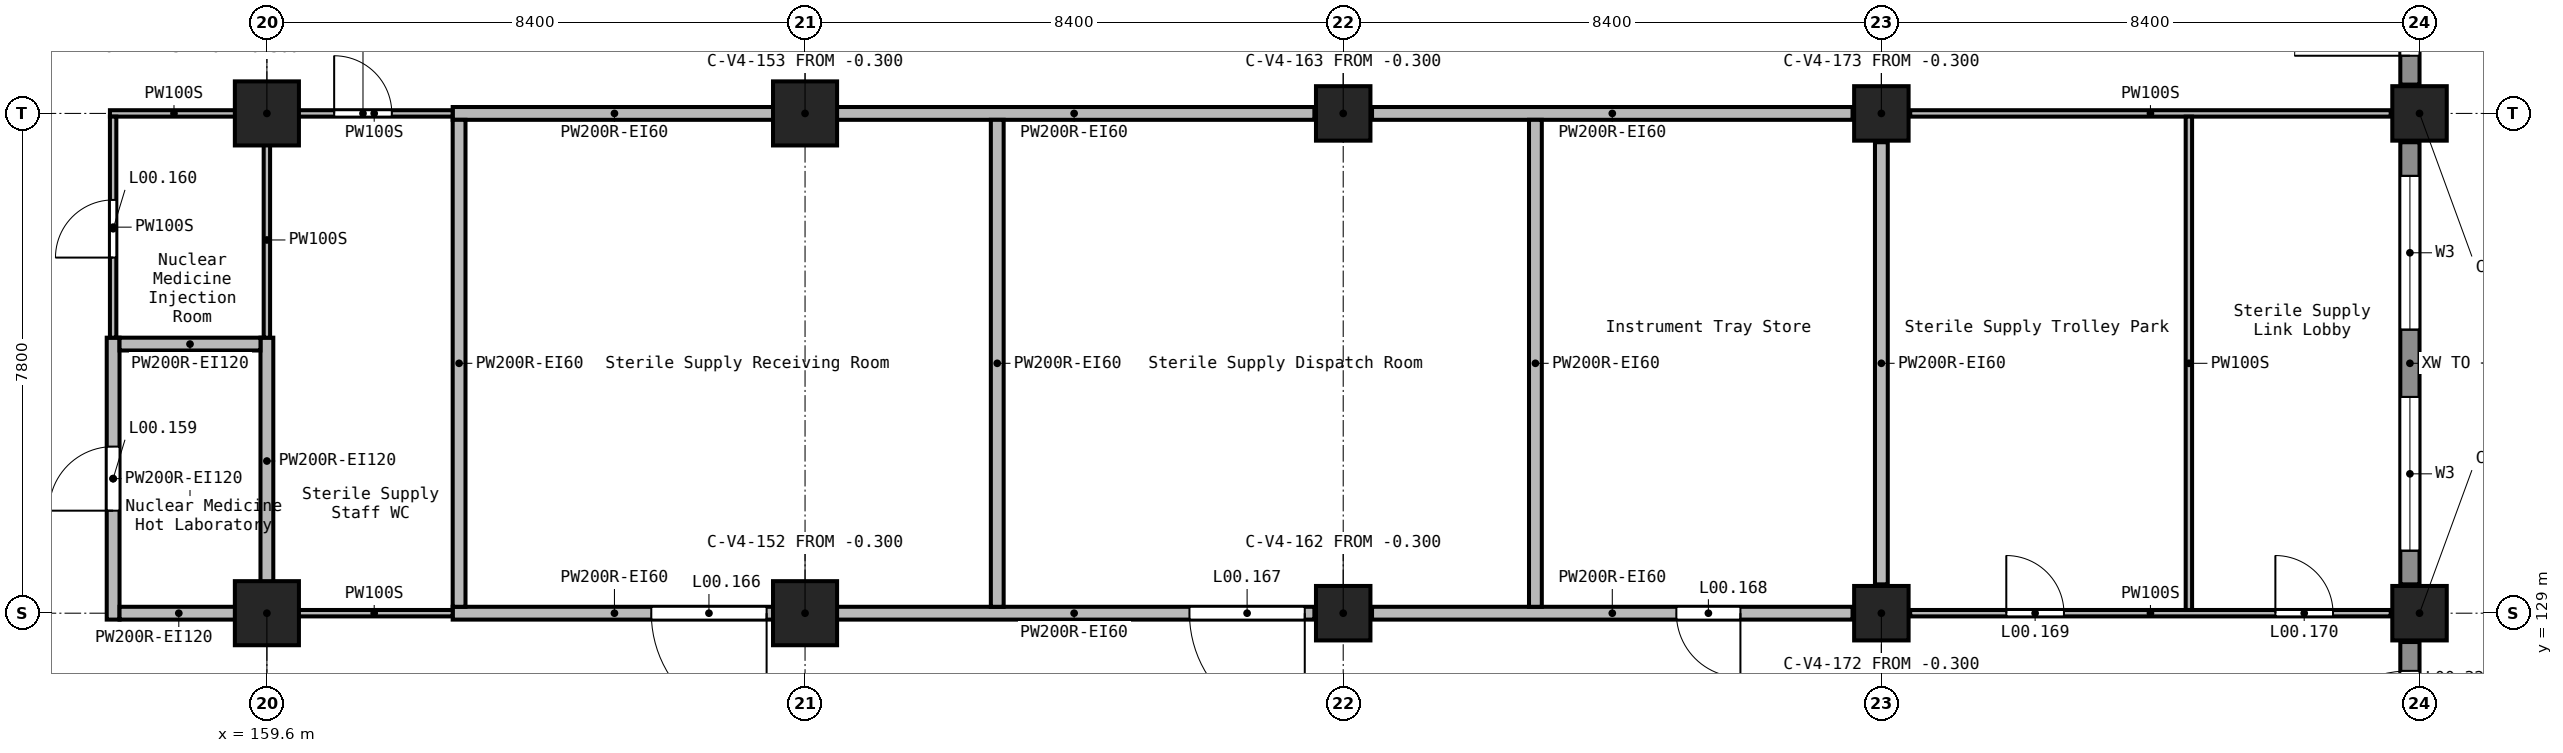
"""IFC4 building model, lengths in metres.
Left out: names, types, materials, properties, quantities, classifications, styles, units other than length and angle.
Written with IfcOpenShell. Run it as: python <this file> out.ifc"""

import sys

from ifc_helpers import new_model, si_unit, direction, frame, frame_2d, origin, origin_2d, place, context, subcontext, project, spatial, rectangle, extrude, element, fill, save


model = new_model("IFC4")
c1 = context("Model", 3, precision=1e-05, world=origin(), true_north=direction((0.0, 1.0)))
c2 = subcontext(c1, "Body", "Model", "MODEL_VIEW")
j1 = project(units=[si_unit("LENGTHUNIT", "METRE"), si_unit("PLANEANGLEUNIT", "RADIAN")], contexts=[c1])
p1 = place(None, origin())
s1 = spatial("IfcSite", under=j1, at=p1, CompositionType="ELEMENT")
p2 = place(p1, origin())
s2 = spatial("IfcBuilding", under=s1, at=p2, CompositionType="ELEMENT")
p3 = place(p2, origin())
s3 = spatial("IfcBuildingStorey", under=s2, at=p3, CompositionType="ELEMENT", Elevation=0.0)
for number, where, z_axis, x_axis in (
    (1, (159.6, 129.0, -0.3), (0.0, 0.0, 1.0), (1.0, 0.0, 0.0)),
    (2, (159.6, 136.8, -0.3), (0.0, 0.0, 1.0), (1.0, 0.0, 0.0)),
    (3, (168.0, 129.0, -0.3), (0.0, 0.0, 1.0), (1.0, 0.0, 0.0)),
    (4, (168.0, 136.8, -0.3), (0.0, 0.0, 1.0), (1.0, 0.0, 0.0)),
):
    element("IfcColumn", number, at=place(p3, frame(where, z_axis=z_axis, x_axis=x_axis)), inside=s3, PredefinedType="COLUMN", context=c2, shape_type="SweptSolid", body=[
        extrude(rectangle(XDim=1.0, YDim=1.0, at=origin_2d()), origin(), (0.0, 0.0, 1.0), 5.7),
    ])
for number, where, z_axis, x_axis in (
    (5, (176.4, 129.0, -0.3), (0.0, 0.0, 1.0), (1.0, 0.0, 0.0)),
    (6, (176.4, 136.8, -0.3), (0.0, 0.0, 1.0), (1.0, 0.0, 0.0)),
    (7, (184.8, 129.0, -0.3), (0.0, 0.0, 1.0), (1.0, 0.0, 0.0)),
    (8, (184.8, 136.8, -0.3), (0.0, 0.0, 1.0), (1.0, 0.0, 0.0)),
    (9, (193.2, 129.0, -0.3), (0.0, 0.0, 1.0), (1.0, 0.0, 0.0)),
    (10, (193.2, 136.8, -0.3), (0.0, 0.0, 1.0), (1.0, 0.0, 0.0)),
):
    element("IfcColumn", number, at=place(p3, frame(where, z_axis=z_axis, x_axis=x_axis)), inside=s3, PredefinedType="COLUMN", context=c2, shape_type="SweptSolid", body=[
        extrude(rectangle(XDim=0.85, YDim=0.85, at=origin_2d()), origin(), (0.0, 0.0, 1.0), 5.7),
    ])
p4 = place(p3, frame((193.05, 125.85, 0.0), z_axis=(0.0, 0.0, 1.0), x_axis=(0.0, 1.0, 0.0)))
e11 = element("IfcWall", 11, at=p4, inside=s3, PredefinedType="STANDARD", context=c2, shape_type="SweptSolid", body=[
    extrude(rectangle(XDim=2.7, YDim=0.3, at=frame_2d((1.35, 0.0))), origin(), (0.0, 0.0, 1.0), 4.25),
])
p5 = place(p4, frame((0.45, 0.0, 0.0)))
e12 = element("IfcOpeningElement", 12, at=p5, cuts=e11, PredefinedType="OPENING", context=c2, shape_type="SweptSolid", body=[
    extrude(rectangle(XDim=1.8, YDim=2.1, at=frame_2d((0.9, 1.05))), frame((0.0, 0.16, 0.0), z_axis=(0.0, -1.0, 0.0), x_axis=(1.0, 0.0, 0.0)), (0.0, 0.0, 1.0), 0.32),
])
p6 = place(p3, frame((193.05, 129.45, 0.0), z_axis=(0.0, 0.0, 1.0), x_axis=(0.0, 1.0, 0.0)))
e13 = element("IfcWall", 13, at=p6, inside=s3, PredefinedType="STANDARD", context=c2, shape_type="SweptSolid", body=[
    extrude(rectangle(XDim=6.9, YDim=0.3, at=frame_2d((3.45, 0.0))), origin(), (0.0, 0.0, 1.0), 4.25),
])
p7 = place(p6, frame((0.525, 0.0, 0.9)))
e14 = element("IfcOpeningElement", 14, at=p7, cuts=e13, PredefinedType="OPENING", context=c2, shape_type="SweptSolid", body=[
    extrude(rectangle(XDim=2.4, YDim=1.5, at=frame_2d((1.2, 0.75))), frame((0.0, 0.16, 0.0), z_axis=(0.0, -1.0, 0.0), x_axis=(1.0, 0.0, 0.0)), (0.0, 0.0, 1.0), 0.32),
])
p8 = place(p6, frame((3.975, 0.0, 0.9)))
e15 = element("IfcOpeningElement", 15, at=p8, cuts=e13, PredefinedType="OPENING", context=c2, shape_type="SweptSolid", body=[
    extrude(rectangle(XDim=2.4, YDim=1.5, at=frame_2d((1.2, 0.75))), frame((0.0, 0.16, 0.0), z_axis=(0.0, -1.0, 0.0), x_axis=(1.0, 0.0, 0.0)), (0.0, 0.0, 1.0), 0.32),
])
p9 = place(p3, frame((193.05, 137.25, 0.0), z_axis=(0.0, 0.0, 1.0), x_axis=(0.0, 1.0, 0.0)))
e16 = element("IfcWall", 16, at=p9, inside=s3, PredefinedType="STANDARD", context=c2, shape_type="SweptSolid", body=[
    extrude(rectangle(XDim=2.7, YDim=0.3, at=frame_2d((1.35, 0.0))), origin(), (0.0, 0.0, 1.0), 4.25),
])
p10 = place(p9, frame((0.45, 0.0, 0.0)))
e17 = element("IfcOpeningElement", 17, at=p10, cuts=e16, PredefinedType="OPENING", context=c2, shape_type="SweptSolid", body=[
    extrude(rectangle(XDim=1.8, YDim=2.1, at=frame_2d((0.9, 1.05))), frame((0.0, 0.16, 0.0), z_axis=(0.0, -1.0, 0.0), x_axis=(1.0, 0.0, 0.0)), (0.0, 0.0, 1.0), 0.32),
])
p11 = place(p3, frame((184.35, 129.0, 0.0), z_axis=(0.0, 0.0, 1.0), x_axis=(-1.0, 0.0, 0.0)))
e18 = element("IfcWall", 18, at=p11, inside=s3, PredefinedType="SOLIDWALL", context=c2, shape_type="SweptSolid", body=[
    extrude(rectangle(XDim=7.5, YDim=0.2, at=frame_2d((3.75, 0.0))), origin(), (0.0, 0.0, 1.0), 5.05),
])
p12 = place(p11, frame((1.75, 0.0, 0.0)))
e19 = element("IfcOpeningElement", 19, at=p12, cuts=e18, PredefinedType="OPENING", context=c2, shape_type="SweptSolid", body=[
    extrude(rectangle(XDim=1.0, YDim=2.1, at=frame_2d((0.5, 1.05))), frame((0.0, 0.11, 0.0), z_axis=(0.0, -1.0, 0.0), x_axis=(1.0, 0.0, 0.0)), (0.0, 0.0, 1.0), 0.22),
])
p13 = place(p3, frame((175.95, 129.0, 0.0), z_axis=(0.0, 0.0, 1.0), x_axis=(-1.0, 0.0, 0.0)))
e20 = element("IfcWall", 20, at=p13, inside=s3, PredefinedType="SOLIDWALL", context=c2, shape_type="SweptSolid", body=[
    extrude(rectangle(XDim=7.5, YDim=0.2, at=frame_2d((3.75, 0.0))), origin(), (0.0, 0.0, 1.0), 5.05),
])
p14 = place(p13, frame((0.15, 0.0, 0.0)))
e21 = element("IfcOpeningElement", 21, at=p14, cuts=e20, PredefinedType="OPENING", context=c2, shape_type="SweptSolid", body=[
    extrude(rectangle(XDim=1.8, YDim=2.1, at=frame_2d((0.9, 1.05))), frame((0.0, 0.11, 0.0), z_axis=(0.0, -1.0, 0.0), x_axis=(1.0, 0.0, 0.0)), (0.0, 0.0, 1.0), 0.22),
])
p15 = place(p3, frame((167.55, 129.0, 0.0), z_axis=(0.0, 0.0, 1.0), x_axis=(-1.0, 0.0, 0.0)))
e22 = element("IfcWall", 22, at=p15, inside=s3, PredefinedType="SOLIDWALL", context=c2, shape_type="SweptSolid", body=[
    extrude(rectangle(XDim=5.05, YDim=0.2, at=frame_2d((2.525, 0.0))), origin(), (0.0, 0.0, 1.0), 5.05),
])
p16 = place(p15, frame((0.15, 0.0, 0.0)))
e23 = element("IfcOpeningElement", 23, at=p16, cuts=e22, PredefinedType="OPENING", context=c2, shape_type="SweptSolid", body=[
    extrude(rectangle(XDim=1.8, YDim=2.1, at=frame_2d((0.9, 1.05))), frame((0.0, 0.11, 0.0), z_axis=(0.0, -1.0, 0.0), x_axis=(1.0, 0.0, 0.0)), (0.0, 0.0, 1.0), 0.22),
])
for number, where, z_axis, x_axis in (
    (24, (184.35, 136.8, 0.0), (0.0, 0.0, 1.0), (-1.0, 0.0, 0.0)),
    (25, (175.95, 136.8, 0.0), (0.0, 0.0, 1.0), (-1.0, 0.0, 0.0)),
):
    element("IfcWall", number, at=place(p3, frame(where, z_axis=z_axis, x_axis=x_axis)), inside=s3, PredefinedType="SOLIDWALL", context=c2, shape_type="SweptSolid", body=[
        extrude(rectangle(XDim=7.5, YDim=0.2, at=frame_2d((3.75, 0.0))), origin(), (0.0, 0.0, 1.0), 5.05),
    ])
p17 = place(p3, frame((167.55, 136.8, 0.0), z_axis=(0.0, 0.0, 1.0), x_axis=(-1.0, 0.0, 0.0)))
e26 = element("IfcWall", 26, at=p17, inside=s3, PredefinedType="SOLIDWALL", context=c2, shape_type="SweptSolid", body=[
    extrude(rectangle(XDim=5.05, YDim=0.2, at=frame_2d((2.525, 0.0))), origin(), (0.0, 0.0, 1.0), 5.05),
])
for number, where, z_axis, x_axis in (
    (27, (162.6, 129.1, 0.0), (0.0, 0.0, 1.0), (0.0, 1.0, 0.0)),
    (28, (171.0, 129.1, 0.0), (0.0, 0.0, 1.0), (0.0, 1.0, 0.0)),
    (29, (179.4, 129.1, 0.0), (0.0, 0.0, 1.0), (0.0, 1.0, 0.0)),
):
    element("IfcWall", number, at=place(p3, frame(where, z_axis=z_axis, x_axis=x_axis)), inside=s3, PredefinedType="SOLIDWALL", context=c2, shape_type="SweptSolid", body=[
        extrude(rectangle(XDim=7.6, YDim=0.2, at=frame_2d((3.8, 0.0))), origin(), (0.0, 0.0, 1.0), 5.05),
    ])
p18 = place(p3, frame((184.8, 129.45, 0.0), z_axis=(0.0, 0.0, 1.0), x_axis=(0.0, 1.0, 0.0)))
e30 = element("IfcWall", 30, at=p18, inside=s3, PredefinedType="SOLIDWALL", context=c2, shape_type="SweptSolid", body=[
    extrude(rectangle(XDim=6.9, YDim=0.2, at=frame_2d((3.45, 0.0))), origin(), (0.0, 0.0, 1.0), 5.05),
])
p19 = place(p3, frame((157.2, 128.9, 0.0), z_axis=(0.0, 0.0, 1.0), x_axis=(0.0, 1.0, 0.0)))
e31 = element("IfcWall", 31, at=p19, inside=s3, PredefinedType="SOLIDWALL", context=c2, shape_type="SweptSolid", body=[
    extrude(rectangle(XDim=4.4, YDim=0.2, at=frame_2d((2.2, 0.0))), origin(), (0.0, 0.0, 1.0), 5.05),
])
p20 = place(p19, frame((1.7, 0.0, 0.0)))
e32 = element("IfcOpeningElement", 32, at=p20, cuts=e31, PredefinedType="OPENING", context=c2, shape_type="SweptSolid", body=[
    extrude(rectangle(XDim=1.0, YDim=2.1, at=frame_2d((0.5, 1.05))), frame((0.0, 0.11, 0.0), z_axis=(0.0, -1.0, 0.0), x_axis=(1.0, 0.0, 0.0)), (0.0, 0.0, 1.0), 0.22),
])
p21 = place(p3, frame((159.6, 129.45, 0.0), z_axis=(0.0, 0.0, 1.0), x_axis=(0.0, 1.0, 0.0)))
e33 = element("IfcWall", 33, at=p21, inside=s3, PredefinedType="SOLIDWALL", context=c2, shape_type="SweptSolid", body=[
    extrude(rectangle(XDim=3.85, YDim=0.2, at=frame_2d((1.925, 0.0))), origin(), (0.0, 0.0, 1.0), 5.05),
])
p22 = place(p3, frame((157.3, 129.0, 0.0), z_axis=(0.0, 0.0, 1.0), x_axis=(1.0, 0.0, 0.0)))
e34 = element("IfcWall", 34, at=p22, inside=s3, PredefinedType="SOLIDWALL", context=c2, shape_type="SweptSolid", body=[
    extrude(rectangle(XDim=1.85, YDim=0.2, at=frame_2d((0.925, 0.0))), origin(), (0.0, 0.0, 1.0), 5.05),
])
p23 = place(p3, frame((157.3, 133.2, 0.0), z_axis=(0.0, 0.0, 1.0), x_axis=(1.0, 0.0, 0.0)))
e35 = element("IfcWall", 35, at=p23, inside=s3, PredefinedType="SOLIDWALL", context=c2, shape_type="SweptSolid", body=[
    extrude(rectangle(XDim=2.2, YDim=0.2, at=frame_2d((1.1, 0.0))), origin(), (0.0, 0.0, 1.0), 5.05),
])
p24 = place(p3, frame((185.25, 129.0, 0.0), z_axis=(0.0, 0.0, 1.0), x_axis=(1.0, 0.0, 0.0)))
e36 = element("IfcWall", 36, at=p24, inside=s3, PredefinedType="PARTITIONING", context=c2, shape_type="SweptSolid", body=[
    extrude(rectangle(XDim=7.5, YDim=0.1, at=frame_2d((3.75, 0.0))), origin(), (0.0, 0.0, 1.0), 5.05),
])
p25 = place(p24, frame((1.5, 0.0, 0.0)))
e37 = element("IfcOpeningElement", 37, at=p25, cuts=e36, PredefinedType="OPENING", context=c2, shape_type="SweptSolid", body=[
    extrude(rectangle(XDim=0.9, YDim=2.1, at=frame_2d((0.45, 1.05))), frame((0.0, 0.06, 0.0), z_axis=(0.0, -1.0, 0.0), x_axis=(1.0, 0.0, 0.0)), (0.0, 0.0, 1.0), 0.12),
])
p26 = place(p24, frame((5.7, 0.0, 0.0)))
e38 = element("IfcOpeningElement", 38, at=p26, cuts=e36, PredefinedType="OPENING", context=c2, shape_type="SweptSolid", body=[
    extrude(rectangle(XDim=0.9, YDim=2.1, at=frame_2d((0.45, 1.05))), frame((0.0, 0.06, 0.0), z_axis=(0.0, -1.0, 0.0), x_axis=(1.0, 0.0, 0.0)), (0.0, 0.0, 1.0), 0.12),
])
p27 = place(p3, frame((185.25, 136.8, 0.0), z_axis=(0.0, 0.0, 1.0), x_axis=(1.0, 0.0, 0.0)))
e39 = element("IfcWall", 39, at=p27, inside=s3, PredefinedType="PARTITIONING", context=c2, shape_type="SweptSolid", body=[
    extrude(rectangle(XDim=7.5, YDim=0.1, at=frame_2d((3.75, 0.0))), origin(), (0.0, 0.0, 1.0), 5.05),
])
p28 = place(p3, frame((189.6, 129.05, 0.0), z_axis=(0.0, 0.0, 1.0), x_axis=(0.0, 1.0, 0.0)))
e40 = element("IfcWall", 40, at=p28, inside=s3, PredefinedType="PARTITIONING", context=c2, shape_type="SweptSolid", body=[
    extrude(rectangle(XDim=7.7, YDim=0.1, at=frame_2d((3.85, 0.0))), origin(), (0.0, 0.0, 1.0), 5.05),
])
p29 = place(p3, frame((157.15, 136.8, 0.0), z_axis=(0.0, 0.0, 1.0), x_axis=(1.0, 0.0, 0.0)))
e41 = element("IfcWall", 41, at=p29, inside=s3, PredefinedType="PARTITIONING", context=c2, shape_type="SweptSolid", body=[
    extrude(rectangle(XDim=2.0, YDim=0.1, at=frame_2d((1.0, 0.0))), origin(), (0.0, 0.0, 1.0), 5.05),
])
p30 = place(p3, frame((160.05, 136.8, 0.0), z_axis=(0.0, 0.0, 1.0), x_axis=(1.0, 0.0, 0.0)))
e42 = element("IfcWall", 42, at=p30, inside=s3, PredefinedType="PARTITIONING", context=c2, shape_type="SweptSolid", body=[
    extrude(rectangle(XDim=2.45, YDim=0.1, at=frame_2d((1.225, 0.0))), origin(), (0.0, 0.0, 1.0), 5.05),
])
p31 = place(p30, frame((0.6, 0.0, 0.0)))
e43 = element("IfcOpeningElement", 43, at=p31, cuts=e42, PredefinedType="OPENING", context=c2, shape_type="SweptSolid", body=[
    extrude(rectangle(XDim=0.9, YDim=2.1, at=frame_2d((0.45, 1.05))), frame((0.0, 0.06, 0.0), z_axis=(0.0, -1.0, 0.0), x_axis=(1.0, 0.0, 0.0)), (0.0, 0.0, 1.0), 0.12),
])
p32 = place(p3, frame((157.2, 133.3, 0.0), z_axis=(0.0, 0.0, 1.0), x_axis=(0.0, 1.0, 0.0)))
e44 = element("IfcWall", 44, at=p32, inside=s3, PredefinedType="PARTITIONING", context=c2, shape_type="SweptSolid", body=[
    extrude(rectangle(XDim=3.45, YDim=0.1, at=frame_2d((1.725, 0.0))), origin(), (0.0, 0.0, 1.0), 5.05),
])
p33 = place(p32, frame((1.25, 0.0, 0.0)))
e45 = element("IfcOpeningElement", 45, at=p33, cuts=e44, PredefinedType="OPENING", context=c2, shape_type="SweptSolid", body=[
    extrude(rectangle(XDim=0.9, YDim=2.1, at=frame_2d((0.45, 1.05))), frame((0.0, 0.06, 0.0), z_axis=(0.0, -1.0, 0.0), x_axis=(1.0, 0.0, 0.0)), (0.0, 0.0, 1.0), 0.12),
])
p34 = place(p3, frame((159.6, 133.3, 0.0), z_axis=(0.0, 0.0, 1.0), x_axis=(0.0, 1.0, 0.0)))
e46 = element("IfcWall", 46, at=p34, inside=s3, PredefinedType="PARTITIONING", context=c2, shape_type="SweptSolid", body=[
    extrude(rectangle(XDim=3.05, YDim=0.1, at=frame_2d((1.525, 0.0))), origin(), (0.0, 0.0, 1.0), 5.05),
])
p35 = place(p3, frame((160.05, 129.0, 0.0), z_axis=(0.0, 0.0, 1.0), x_axis=(1.0, 0.0, 0.0)))
e47 = element("IfcWall", 47, at=p35, inside=s3, PredefinedType="PARTITIONING", context=c2, shape_type="SweptSolid", body=[
    extrude(rectangle(XDim=2.45, YDim=0.1, at=frame_2d((1.225, 0.0))), origin(), (0.0, 0.0, 1.0), 5.05),
])
p36 = place(p5, frame((1.8, 0.0, 0.0), z_axis=(0.0, 0.0, 1.0), x_axis=(-1.0, 0.0, 0.0)))
e48 = element("IfcDoor", 48, at=p36, inside=s3, OperationType="SINGLE_SWING_LEFT", PredefinedType="DOOR", context=c2, shape_type="SweptSolid", body=[
    extrude(rectangle(XDim=1.8, YDim=2.1, at=frame_2d((0.9, 1.05))), frame((0.0, 0.025, 0.0), z_axis=(0.0, -1.0, 0.0), x_axis=(1.0, 0.0, 0.0)), (0.0, 0.0, 1.0), 0.05),
])
fill(e12, e48)
p37 = place(p10, frame((1.8, 0.0, 0.0), z_axis=(0.0, 0.0, 1.0), x_axis=(-1.0, 0.0, 0.0)))
e49 = element("IfcDoor", 49, at=p37, inside=s3, OperationType="SINGLE_SWING_LEFT", PredefinedType="DOOR", context=c2, shape_type="SweptSolid", body=[
    extrude(rectangle(XDim=1.8, YDim=2.1, at=frame_2d((0.9, 1.05))), frame((0.0, 0.025, 0.0), z_axis=(0.0, -1.0, 0.0), x_axis=(1.0, 0.0, 0.0)), (0.0, 0.0, 1.0), 0.05),
])
fill(e17, e49)
p38 = place(p7, origin())
e50 = element("IfcWindow", 50, at=p38, inside=s3, PartitioningType="SINGLE_PANEL", PredefinedType="WINDOW", context=c2, shape_type="SweptSolid", body=[
    extrude(rectangle(XDim=2.4, YDim=1.5, at=frame_2d((1.2, 0.75))), frame((0.0, 0.03, 0.0), z_axis=(0.0, -1.0, 0.0), x_axis=(1.0, 0.0, 0.0)), (0.0, 0.0, 1.0), 0.06),
])
fill(e14, e50)
p39 = place(p8, origin())
e51 = element("IfcWindow", 51, at=p39, inside=s3, PartitioningType="SINGLE_PANEL", PredefinedType="WINDOW", context=c2, shape_type="SweptSolid", body=[
    extrude(rectangle(XDim=2.4, YDim=1.5, at=frame_2d((1.2, 0.75))), frame((0.0, 0.03, 0.0), z_axis=(0.0, -1.0, 0.0), x_axis=(1.0, 0.0, 0.0)), (0.0, 0.0, 1.0), 0.06),
])
fill(e15, e51)
p40 = place(p20, frame((1.0, 0.0, 0.0), z_axis=(0.0, 0.0, 1.0), x_axis=(-1.0, 0.0, 0.0)))
e52 = element("IfcDoor", 52, at=p40, inside=s3, OperationType="SINGLE_SWING_RIGHT", PredefinedType="DOOR", context=c2, shape_type="SweptSolid", body=[
    extrude(rectangle(XDim=1.0, YDim=2.1, at=frame_2d((0.5, 1.05))), frame((0.0, 0.025, 0.0), z_axis=(0.0, -1.0, 0.0), x_axis=(1.0, 0.0, 0.0)), (0.0, 0.0, 1.0), 0.05),
])
fill(e32, e52)
p41 = place(p33, frame((0.9, 0.0, 0.0), z_axis=(0.0, 0.0, 1.0), x_axis=(-1.0, 0.0, 0.0)))
e53 = element("IfcDoor", 53, at=p41, inside=s3, OperationType="SINGLE_SWING_RIGHT", PredefinedType="DOOR", context=c2, shape_type="SweptSolid", body=[
    extrude(rectangle(XDim=0.9, YDim=2.1, at=frame_2d((0.45, 1.05))), frame((0.0, 0.025, 0.0), z_axis=(0.0, -1.0, 0.0), x_axis=(1.0, 0.0, 0.0)), (0.0, 0.0, 1.0), 0.05),
])
fill(e45, e53)
p42 = place(p31, frame((0.9, 0.0, 0.0), z_axis=(0.0, 0.0, 1.0), x_axis=(-1.0, 0.0, 0.0)))
e54 = element("IfcDoor", 54, at=p42, inside=s3, OperationType="SINGLE_SWING_RIGHT", PredefinedType="DOOR", context=c2, shape_type="SweptSolid", body=[
    extrude(rectangle(XDim=0.9, YDim=2.1, at=frame_2d((0.45, 1.05))), frame((0.0, 0.025, 0.0), z_axis=(0.0, -1.0, 0.0), x_axis=(1.0, 0.0, 0.0)), (0.0, 0.0, 1.0), 0.05),
])
fill(e43, e54)
p43 = place(p16, frame((1.8, 0.0, 0.0), z_axis=(0.0, 0.0, 1.0), x_axis=(-1.0, 0.0, 0.0)))
e55 = element("IfcDoor", 55, at=p43, inside=s3, OperationType="DOUBLE_DOOR_SINGLE_SWING", PredefinedType="DOOR", context=c2, shape_type="SweptSolid", body=[
    extrude(rectangle(XDim=1.8, YDim=2.1, at=frame_2d((0.9, 1.05))), frame((0.0, 0.025, 0.0), z_axis=(0.0, -1.0, 0.0), x_axis=(1.0, 0.0, 0.0)), (0.0, 0.0, 1.0), 0.05),
])
fill(e23, e55)
p44 = place(p14, frame((1.8, 0.0, 0.0), z_axis=(0.0, 0.0, 1.0), x_axis=(-1.0, 0.0, 0.0)))
e56 = element("IfcDoor", 56, at=p44, inside=s3, OperationType="DOUBLE_DOOR_SINGLE_SWING", PredefinedType="DOOR", context=c2, shape_type="SweptSolid", body=[
    extrude(rectangle(XDim=1.8, YDim=2.1, at=frame_2d((0.9, 1.05))), frame((0.0, 0.025, 0.0), z_axis=(0.0, -1.0, 0.0), x_axis=(1.0, 0.0, 0.0)), (0.0, 0.0, 1.0), 0.05),
])
fill(e21, e56)
p45 = place(p12, frame((1.0, 0.0, 0.0), z_axis=(0.0, 0.0, 1.0), x_axis=(-1.0, 0.0, 0.0)))
e57 = element("IfcDoor", 57, at=p45, inside=s3, OperationType="SINGLE_SWING_RIGHT", PredefinedType="DOOR", context=c2, shape_type="SweptSolid", body=[
    extrude(rectangle(XDim=1.0, YDim=2.1, at=frame_2d((0.5, 1.05))), frame((0.0, 0.025, 0.0), z_axis=(0.0, -1.0, 0.0), x_axis=(1.0, 0.0, 0.0)), (0.0, 0.0, 1.0), 0.05),
])
fill(e19, e57)
p46 = place(p25, origin())
e58 = element("IfcDoor", 58, at=p46, inside=s3, OperationType="SINGLE_SWING_LEFT", PredefinedType="DOOR", context=c2, shape_type="SweptSolid", body=[
    extrude(rectangle(XDim=0.9, YDim=2.1, at=frame_2d((0.45, 1.05))), frame((0.0, 0.025, 0.0), z_axis=(0.0, -1.0, 0.0), x_axis=(1.0, 0.0, 0.0)), (0.0, 0.0, 1.0), 0.05),
])
fill(e37, e58)
p47 = place(p26, origin())
e59 = element("IfcDoor", 59, at=p47, inside=s3, OperationType="SINGLE_SWING_RIGHT", PredefinedType="DOOR", context=c2, shape_type="SweptSolid", body=[
    extrude(rectangle(XDim=0.9, YDim=2.1, at=frame_2d((0.45, 1.05))), frame((0.0, 0.025, 0.0), z_axis=(0.0, -1.0, 0.0), x_axis=(1.0, 0.0, 0.0)), (0.0, 0.0, 1.0), 0.05),
])
fill(e38, e59)
save(model, sys.argv[1])
